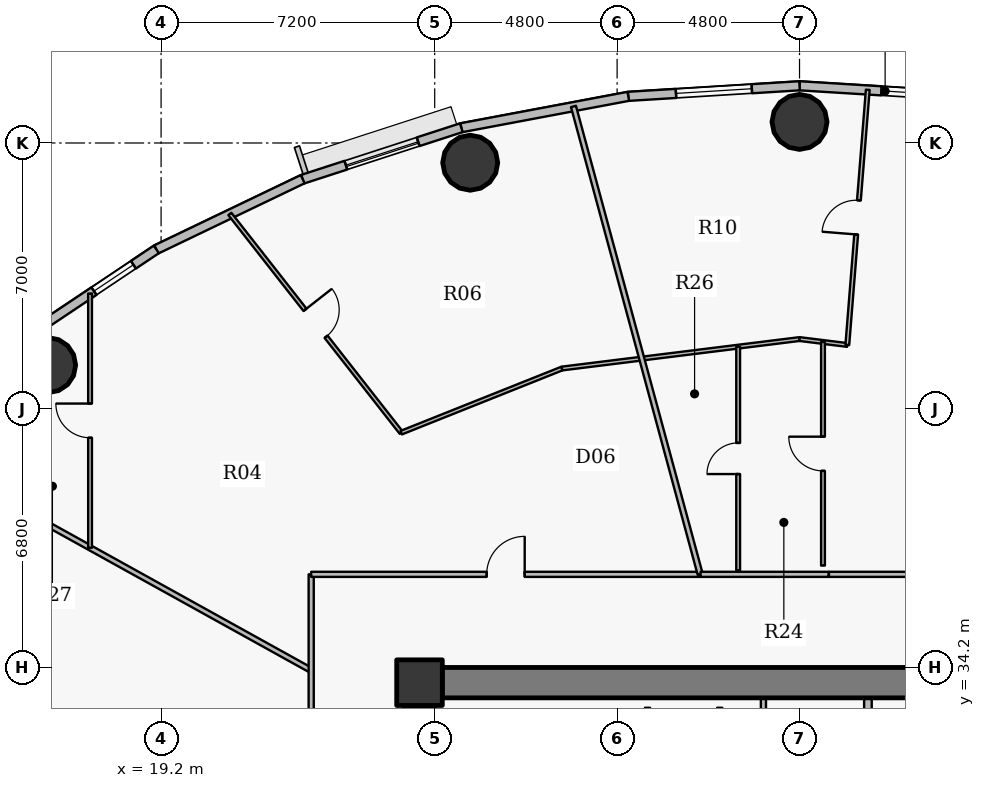
"""IFC4 building model, lengths in metres.
Left out: names, types, materials, properties, quantities, classifications, styles, units other than length and angle.
Written with IfcOpenShell. Run it as: python <this file> out.ifc"""

import sys

from ifc_helpers import new_model, si_unit, direction, frame, frame_2d, origin, origin_2d, place, context, subcontext, project, spatial, rectangle, hollow_circle, extrude, source, transform, mapped, element, fill, save


model = new_model("IFC4")
c1 = context("Model", 3, precision=1e-05, world=origin(), true_north=direction((0.0, 1.0)))
c2 = subcontext(c1, "Body", "Model", "MODEL_VIEW")
j1 = project(units=[si_unit("LENGTHUNIT", "METRE"), si_unit("PLANEANGLEUNIT", "RADIAN")], contexts=[c1])
p1 = place(None, origin())
s1 = spatial("IfcSite", under=j1, at=p1, CompositionType="ELEMENT")
p2 = place(p1, origin())
s2 = spatial("IfcBuilding", under=s1, at=p2, CompositionType="ELEMENT")
p3 = place(p2, frame((0.0, 0.0, 142.2)))
s3 = spatial("IfcBuildingStorey", under=s2, at=p3, CompositionType="ELEMENT", Elevation=142.2)
p4 = place(p3, frame((26.0, 33.8, 0.0), z_axis=(0.0, 0.0, 1.0), x_axis=(1.0, 0.0, 0.0)))
e1 = element("IfcColumn", 1, at=p4, inside=s3, PredefinedType="COLUMN", context=c2, shape_type="SweptSolid", body=[
    extrude(rectangle(XDim=1.2, YDim=1.2, at=origin_2d()), origin(), (0.0, 0.0, 1.0), 3.75),
])
p5 = place(p3, frame((26.6, 33.8, 0.0), z_axis=(0.0, 0.0, 1.0), x_axis=(1.0, 0.0, 0.0)))
e2 = element("IfcWall", 2, at=p5, inside=s3, PredefinedType="SHEAR", context=c2, shape_type="SweptSolid", body=[
    extrude(rectangle(XDim=18.8, YDim=0.8, at=frame_2d((9.4, 0.0))), origin(), (0.0, 0.0, 1.0), 2.9),
])
p6 = place(p3, frame((26.0, 20.8, 0.0), z_axis=(0.0, 0.0, 1.0), x_axis=(0.0, 1.0, 0.0)))
e3 = element("IfcWall", 3, at=p6, inside=s3, PredefinedType="SHEAR", context=c2, shape_type="SweptSolid", body=[
    extrude(rectangle(XDim=12.4, YDim=0.8, at=frame_2d((6.2, 0.0))), origin(), (0.0, 0.0, 1.0), 2.9),
])
p7 = place(p6, frame((5.79, 0.0, 0.0)))
e4 = element("IfcOpeningElement", 4, at=p7, cuts=e3, PredefinedType="OPENING", context=c2, shape_type="SweptSolid", body=[
    extrude(rectangle(XDim=0.82, YDim=2.1, at=origin_2d()), frame((0.41, 0.41, 1.05), z_axis=(0.0, -1.0, 0.0), x_axis=(1.0, 0.0, 0.0)), (0.0, 0.0, 1.0), 0.82),
])
for number, where, z_axis, x_axis in (
    (5, (36.0, 48.555, 0.0), (0.0, 0.0, 1.0), (1.0, 0.0, 0.0)),
    (6, (27.334, 47.481, 0.0), (0.0, 0.0, 1.0), (1.0, 0.0, 0.0)),
    (7, (16.227, 42.156, 0.0), (0.0, 0.0, 1.0), (1.0, 0.0, 0.0)),
):
    element("IfcColumn", number, at=place(p3, frame(where, z_axis=z_axis, x_axis=x_axis)), inside=s3, PredefinedType="COLUMN", context=c2, shape_type="SweptSolid", body=[
        extrude(hollow_circle(Radius=0.725, WallThickness=0.042, at=origin_2d()), origin(), (0.0, 0.0, 1.0), 3.75),
    ])
p8 = place(p3, frame((36.0, 49.505, 0.0), z_axis=(0.0, 0.0, 1.0), x_axis=(0.998107531589, -0.061492726276, 0.0)))
e8 = element("IfcWall", 8, at=p8, inside=s3, PredefinedType="SOLIDWALL", context=c2, shape_type="SweptSolid", body=[
    extrude(rectangle(XDim=4.514, YDim=0.24, at=frame_2d((2.257, 0.0))), origin(), (0.0, 0.0, 1.0), 3.45),
])
p9 = place(p8, frame((2.161, 0.0, 0.9)))
e9 = element("IfcOpeningElement", 9, at=p9, cuts=e8, PredefinedType="OPENING", context=c2, shape_type="SweptSolid", body=[
    extrude(rectangle(XDim=1.6, YDim=1.75, at=origin_2d()), frame((0.8, 0.13, 0.875), z_axis=(0.0, -1.0, 0.0), x_axis=(1.0, 0.0, 0.0)), (0.0, 0.0, 1.0), 0.26),
])
p10 = place(p3, frame((31.494, 49.227, 0.0), z_axis=(0.0, 0.0, 1.0), x_axis=(0.998107531589, 0.061492726276, 0.0)))
e10 = element("IfcWall", 10, at=p10, inside=s3, PredefinedType="SOLIDWALL", context=c2, shape_type="SweptSolid", body=[
    extrude(rectangle(XDim=4.514, YDim=0.24, at=frame_2d((2.257, 0.0))), origin(), (0.0, 0.0, 1.0), 3.45),
])
p11 = place(p10, frame((1.257, 0.0, 0.9)))
e11 = element("IfcOpeningElement", 11, at=p11, cuts=e10, PredefinedType="OPENING", context=c2, shape_type="SweptSolid", body=[
    extrude(rectangle(XDim=2.0, YDim=1.75, at=origin_2d()), frame((1.0, 0.13, 0.875), z_axis=(0.0, -1.0, 0.0), x_axis=(1.0, 0.0, 0.0)), (0.0, 0.0, 1.0), 0.26),
])
p12 = place(p3, frame((27.1, 48.401, 0.0), z_axis=(0.0, 0.0, 1.0), x_axis=(0.982789252177, 0.184730305596, 0.0)))
e12 = element("IfcWall", 12, at=p12, inside=s3, PredefinedType="SOLIDWALL", context=c2, shape_type="SweptSolid", body=[
    extrude(rectangle(XDim=4.471, YDim=0.24, at=frame_2d((2.235, 0.0))), origin(), (0.0, 0.0, 1.0), 3.45),
])
p13 = place(p3, frame((22.926, 47.047, 0.0), z_axis=(0.0, 0.0, 1.0), x_axis=(0.951211346073, 0.308540070495, 0.0)))
e13 = element("IfcWall", 13, at=p13, inside=s3, PredefinedType="SOLIDWALL", context=c2, shape_type="SweptSolid", body=[
    extrude(rectangle(XDim=4.388, YDim=0.24, at=frame_2d((2.194, 0.0))), origin(), (0.0, 0.0, 1.0), 3.45),
])
p14 = place(p13, frame((1.194, 0.0, 0.9)))
e14 = element("IfcOpeningElement", 14, at=p14, cuts=e13, PredefinedType="OPENING", context=c2, shape_type="SweptSolid", body=[
    extrude(rectangle(XDim=2.0, YDim=1.75, at=origin_2d()), frame((1.0, 0.13, 0.875), z_axis=(0.0, -1.0, 0.0), x_axis=(1.0, 0.0, 0.0)), (0.0, 0.0, 1.0), 0.26),
])
p15 = place(p3, frame((19.075, 45.199, 0.0), z_axis=(0.0, 0.0, 1.0), x_axis=(0.901589935876, 0.432591709962, 0.0)))
e15 = element("IfcWall", 15, at=p15, inside=s3, PredefinedType="SOLIDWALL", context=c2, shape_type="SweptSolid", body=[
    extrude(rectangle(XDim=4.272, YDim=0.24, at=frame_2d((2.136, 0.0))), origin(), (0.0, 0.0, 1.0), 3.45),
])
p16 = place(p3, frame((15.642, 42.903, 0.0), z_axis=(0.0, 0.0, 1.0), x_axis=(0.831221811447, 0.555940914284, 0.0)))
e16 = element("IfcWall", 16, at=p16, inside=s3, PredefinedType="SOLIDWALL", context=c2, shape_type="SweptSolid", body=[
    extrude(rectangle(XDim=4.13, YDim=0.24, at=frame_2d((2.065, 0.0))), origin(), (0.0, 0.0, 1.0), 3.45),
])
p17 = place(p16, frame((2.156, 0.0, 0.9)))
e17 = element("IfcOpeningElement", 17, at=p17, cuts=e16, PredefinedType="OPENING", context=c2, shape_type="SweptSolid", body=[
    extrude(rectangle(XDim=1.25, YDim=1.65, at=origin_2d()), frame((0.625, 0.13, 0.825), z_axis=(0.0, -1.0, 0.0), x_axis=(1.0, 0.0, 0.0)), (0.0, 0.0, 1.0), 0.26),
])
p18 = place(p3, frame((12.539, 40.005, 0.0), z_axis=(0.0, 0.0, 1.0), x_axis=(0.874619146564, -0.484810631549, 0.0)))
e18 = element("IfcWall", 18, at=p18, inside=s3, PredefinedType="PARTITIONING", context=c2, shape_type="SweptSolid", body=[
    extrude(rectangle(XDim=12.132, YDim=0.135, at=frame_2d((6.066, 0.0))), origin(), (0.0, 0.0, 1.0), 2.885),
])
p19 = place(p3, frame((17.331, 37.348, 0.0), z_axis=(0.0, 0.0, 1.0), x_axis=(0.0, 1.0, 0.0)))
e19 = element("IfcWall", 19, at=p19, inside=s3, PredefinedType="PARTITIONING", context=c2, shape_type="SweptSolid", body=[
    extrude(rectangle(XDim=6.691, YDim=0.1, at=frame_2d((3.345, 0.0))), origin(), (0.0, 0.0, 1.0), 2.885),
])
p20 = place(p19, frame((2.895, 0.0, 0.0)))
e20 = element("IfcOpeningElement", 20, at=p20, cuts=e19, PredefinedType="OPENING", context=c2, shape_type="SweptSolid", body=[
    extrude(rectangle(XDim=0.9, YDim=2.1, at=origin_2d()), frame((0.45, 0.06, 1.05), z_axis=(0.0, -1.0, 0.0), x_axis=(1.0, 0.0, 0.0)), (0.0, 0.0, 1.0), 0.12),
])
p21 = place(p3, frame((21.01, 46.133, 0.0), z_axis=(0.0, 0.0, 1.0), x_axis=(0.616738538538, -0.787168072956, 0.0)))
e21 = element("IfcWall", 21, at=p21, inside=s3, PredefinedType="PARTITIONING", context=c2, shape_type="SweptSolid", body=[
    extrude(rectangle(XDim=7.312, YDim=0.1, at=frame_2d((3.656, 0.0))), origin(), (0.0, 0.0, 1.0), 2.885),
])
p22 = place(p21, frame((3.206, 0.0, 0.0)))
e22 = element("IfcOpeningElement", 22, at=p22, cuts=e21, PredefinedType="OPENING", context=c2, shape_type="SweptSolid", body=[
    extrude(rectangle(XDim=0.9, YDim=2.1, at=origin_2d()), frame((0.45, 0.06, 1.05), z_axis=(0.0, -1.0, 0.0), x_axis=(1.0, 0.0, 0.0)), (0.0, 0.0, 1.0), 0.12),
])
p23 = place(p3, frame((23.15, 17.35, 0.0), z_axis=(0.0, 0.0, 1.0), x_axis=(0.0, 1.0, 0.0)))
e23 = element("IfcWall", 23, at=p23, inside=s3, PredefinedType="PARTITIONING", context=c2, shape_type="SweptSolid", body=[
    extrude(rectangle(XDim=19.3, YDim=0.135, at=frame_2d((9.65, 0.0))), origin(), (0.0, 0.0, 1.0), 2.885),
])
p24 = place(p23, frame((11.733, 0.0, 0.0)))
e24 = element("IfcOpeningElement", 24, at=p24, cuts=e23, PredefinedType="OPENING", context=c2, shape_type="SweptSolid", body=[
    extrude(rectangle(XDim=1.05, YDim=2.15, at=origin_2d()), frame((0.525, 0.078, 1.075), z_axis=(0.0, -1.0, 0.0), x_axis=(1.0, 0.0, 0.0)), (0.0, 0.0, 1.0), 0.155),
])
p25 = place(p23, frame((6.074, 0.0, 0.0)))
e25 = element("IfcOpeningElement", 25, at=p25, cuts=e23, PredefinedType="OPENING", context=c2, shape_type="SweptSolid", body=[
    extrude(rectangle(XDim=0.82, YDim=2.1, at=origin_2d()), frame((0.41, 0.078, 1.05), z_axis=(0.0, -1.0, 0.0), x_axis=(1.0, 0.0, 0.0)), (0.0, 0.0, 1.0), 0.155),
])
p26 = place(p3, frame((23.15, 36.65, 0.0), z_axis=(0.0, 0.0, 1.0), x_axis=(1.0, 0.0, 0.0)))
e26 = element("IfcWall", 26, at=p26, inside=s3, PredefinedType="PARTITIONING", context=c2, shape_type="SweptSolid", body=[
    extrude(rectangle(XDim=10.236, YDim=0.135, at=frame_2d((5.118, 0.0))), origin(), (0.0, 0.0, 1.0), 2.885),
])
p27 = place(p26, frame((4.618, 0.0, 0.0)))
e27 = element("IfcOpeningElement", 27, at=p27, cuts=e26, PredefinedType="OPENING", context=c2, shape_type="SweptSolid", body=[
    extrude(rectangle(XDim=1.0, YDim=2.15, at=origin_2d()), frame((0.5, 0.078, 1.075), z_axis=(0.0, -1.0, 0.0), x_axis=(1.0, 0.0, 0.0)), (0.0, 0.0, 1.0), 0.155),
])
p28 = place(p3, frame((25.519, 40.378, 0.0), z_axis=(0.0, 0.0, 1.0), x_axis=(0.928790623107, 0.37060488182, 0.0)))
e28 = element("IfcWall", 28, at=p28, inside=s3, PredefinedType="PARTITIONING", context=c2, shape_type="SweptSolid", body=[
    extrude(rectangle(XDim=4.554, YDim=0.1, at=frame_2d((2.277, 0.0))), origin(), (0.0, 0.0, 1.0), 2.885),
])
p29 = place(p3, frame((29.749, 42.066, 0.0), z_axis=(0.0, 0.0, 1.0), x_axis=(0.992395485088, 0.123090215599, 0.0)))
e29 = element("IfcWall", 29, at=p29, inside=s3, PredefinedType="PARTITIONING", context=c2, shape_type="SweptSolid", body=[
    extrude(rectangle(XDim=6.299, YDim=0.1, at=frame_2d((3.15, 0.0))), origin(), (0.0, 0.0, 1.0), 2.885),
])
p30 = place(p3, frame((30.052, 48.961, 0.0), z_axis=(0.0, 0.0, 1.0), x_axis=(0.261432565902, -0.965221743169, 0.0)))
e30 = element("IfcWall", 30, at=p30, inside=s3, PredefinedType="PARTITIONING", context=c2, shape_type="SweptSolid", body=[
    extrude(rectangle(XDim=12.755, YDim=0.135, at=frame_2d((6.377, 0.0))), origin(), (0.0, 0.0, 1.0), 2.885),
])
p31 = place(p3, frame((34.385, 36.757, 0.0), z_axis=(0.0, 0.0, 1.0), x_axis=(0.0, 1.0, 0.0)))
e31 = element("IfcWall", 31, at=p31, inside=s3, PredefinedType="PARTITIONING", context=c2, shape_type="SweptSolid", body=[
    extrude(rectangle(XDim=5.884, YDim=0.1, at=frame_2d((2.942, 0.0))), origin(), (0.0, 0.0, 1.0), 3.035),
])
p32 = place(p31, frame((2.532, 0.0, 0.0)))
e32 = element("IfcOpeningElement", 32, at=p32, cuts=e31, PredefinedType="OPENING", context=c2, shape_type="SweptSolid", body=[
    extrude(rectangle(XDim=0.82, YDim=2.1, at=origin_2d()), frame((0.41, 0.06, 1.05), z_axis=(0.0, -1.0, 0.0), x_axis=(1.0, 0.0, 0.0)), (0.0, 0.0, 1.0), 0.12),
])
p33 = place(p3, frame((35.05, 31.05, 0.0), z_axis=(0.0, 0.0, 1.0), x_axis=(0.0, 1.0, 0.0)))
e33 = element("IfcWall", 33, at=p33, inside=s3, PredefinedType="PARTITIONING", context=c2, shape_type="SweptSolid", body=[
    extrude(rectangle(XDim=2.35, YDim=0.135, at=frame_2d((1.175, 0.0))), origin(), (0.0, 0.0, 1.0), 3.035),
])
p34 = place(p33, frame((0.625, 0.0, 0.0)))
e34 = element("IfcOpeningElement", 34, at=p34, cuts=e33, PredefinedType="OPENING", context=c2, shape_type="SweptSolid", body=[
    extrude(rectangle(XDim=1.1, YDim=2.15, at=origin_2d()), frame((0.55, 0.078, 1.075), z_axis=(0.0, -1.0, 0.0), x_axis=(1.0, 0.0, 0.0)), (0.0, 0.0, 1.0), 0.155),
])
p35 = place(p3, frame((36.0, 42.841, 0.0), z_axis=(0.0, 0.0, 1.0), x_axis=(0.992384274499, -0.123180565541, 0.0)))
e35 = element("IfcWall", 35, at=p35, inside=s3, PredefinedType="PARTITIONING", context=c2, shape_type="SweptSolid", body=[
    extrude(rectangle(XDim=1.267, YDim=0.1, at=frame_2d((0.633, 0.0))), origin(), (0.0, 0.0, 1.0), 2.885),
])
p36 = place(p3, frame((36.617, 36.881, 0.0), z_axis=(0.0, 0.0, 1.0), x_axis=(0.0, 1.0, 0.0)))
e36 = element("IfcWall", 36, at=p36, inside=s3, PredefinedType="PARTITIONING", context=c2, shape_type="SweptSolid", body=[
    extrude(rectangle(XDim=5.884, YDim=0.1, at=frame_2d((2.942, 0.0))), origin(), (0.0, 0.0, 1.0), 3.45),
])
p37 = place(p36, frame((2.492, 0.0, 0.0)))
e37 = element("IfcOpeningElement", 37, at=p37, cuts=e36, PredefinedType="OPENING", context=c2, shape_type="SweptSolid", body=[
    extrude(rectangle(XDim=0.9, YDim=2.1, at=origin_2d()), frame((0.45, 0.06, 1.05), z_axis=(0.0, -1.0, 0.0), x_axis=(1.0, 0.0, 0.0)), (0.0, 0.0, 1.0), 0.12),
])
p38 = place(p3, frame((36.774, 36.65, 0.0), z_axis=(0.0, 0.0, 1.0), x_axis=(1.0, 0.0, 0.0)))
e38 = element("IfcWall", 38, at=p38, inside=s3, PredefinedType="PARTITIONING", context=c2, shape_type="SweptSolid", body=[
    extrude(rectangle(XDim=12.076, YDim=0.135, at=frame_2d((6.038, 0.0))), origin(), (0.0, 0.0, 1.0), 2.885),
])
p39 = place(p38, frame((5.538, 0.0, 0.0)))
e39 = element("IfcOpeningElement", 39, at=p39, cuts=e38, PredefinedType="OPENING", context=c2, shape_type="SweptSolid", body=[
    extrude(rectangle(XDim=1.0, YDim=2.15, at=origin_2d()), frame((0.5, 0.078, 1.075), z_axis=(0.0, -1.0, 0.0), x_axis=(1.0, 0.0, 0.0)), (0.0, 0.0, 1.0), 0.155),
])
p40 = place(p3, frame((37.258, 42.685, 0.0), z_axis=(0.0, 0.0, 1.0), x_axis=(0.079919529762, 0.9968013186, 0.0)))
e40 = element("IfcWall", 40, at=p40, inside=s3, PredefinedType="PARTITIONING", context=c2, shape_type="SweptSolid", body=[
    extrude(rectangle(XDim=6.736, YDim=0.1, at=frame_2d((3.368, 0.0))), origin(), (0.0, 0.0, 1.0), 2.885),
])
p41 = place(p40, frame((2.918, 0.0, 0.0)))
e41 = element("IfcOpeningElement", 41, at=p41, cuts=e40, PredefinedType="OPENING", context=c2, shape_type="SweptSolid", body=[
    extrude(rectangle(XDim=0.9, YDim=2.1, at=origin_2d()), frame((0.45, 0.06, 1.05), z_axis=(0.0, -1.0, 0.0), x_axis=(1.0, 0.0, 0.0)), (0.0, 0.0, 1.0), 0.12),
])
p42 = place(p3, frame((37.8, 31.05, 0.0), z_axis=(0.0, 0.0, 1.0), x_axis=(0.0, 1.0, 0.0)))
e42 = element("IfcWall", 42, at=p42, inside=s3, PredefinedType="PARTITIONING", context=c2, shape_type="SweptSolid", body=[
    extrude(rectangle(XDim=2.35, YDim=0.2, at=frame_2d((1.175, 0.0))), origin(), (0.0, 0.0, 1.0), 3.035),
])
p43 = place(p3, frame((32.0, 33.14, 0.0), z_axis=(0.0, 0.0, 1.0), x_axis=(0.0, -1.0, 0.0)))
e43 = element("IfcWall", 43, at=p43, inside=s3, PredefinedType="PARTITIONING", context=c2, shape_type="SweptSolid", body=[
    extrude(rectangle(XDim=1.03, YDim=0.135, at=frame_2d((0.515, 0.0))), origin(), (0.0, 0.0, 1.0), 2.985),
])
p44 = place(p3, frame((33.9, 32.11, 0.0), z_axis=(0.0, 0.0, 1.0), x_axis=(0.0, 1.0, 0.0)))
e44 = element("IfcWall", 44, at=p44, inside=s3, PredefinedType="PARTITIONING", context=c2, shape_type="SweptSolid", body=[
    extrude(rectangle(XDim=1.03, YDim=0.135, at=frame_2d((0.515, 0.0))), origin(), (0.0, 0.0, 1.0), 3.035),
])
p45 = place(p3, frame((33.396, 36.65, 0.0), z_axis=(0.0, 0.0, 1.0), x_axis=(1.0, 0.0, 0.0)))
e45 = element("IfcWall", 45, at=p45, inside=s3, PredefinedType="PARTITIONING", context=c2, shape_type="SweptSolid", body=[
    extrude(rectangle(XDim=3.367, YDim=0.135, at=frame_2d((1.684, 0.0))), origin(), (0.0, 0.0, 1.0), 2.885),
])
p46 = place(p3, frame((26.59, 34.2, 0.0), z_axis=(0.0, 0.0, 1.0), x_axis=(-1.0, 0.0, 0.0)))
e46 = element("IfcWall", 46, at=p46, inside=s3, PredefinedType="PARTITIONING", context=c2, shape_type="SweptSolid", body=[
    extrude(rectangle(XDim=0.99, YDim=0.135, at=frame_2d((0.495, 0.0))), origin(), (0.0, 0.0, 1.0), 2.885),
])
p47 = place(p3, frame((25.6, 33.893, 0.0), z_axis=(0.0, 0.0, 1.0), x_axis=(0.0, -1.0, 0.0)))
e47 = element("IfcWall", 47, at=p47, inside=s3, PredefinedType="PARTITIONING", context=c2, shape_type="SweptSolid", body=[
    extrude(rectangle(XDim=0.683, YDim=0.135, at=frame_2d((0.341, 0.0))), origin(), (0.0, 0.0, 1.0), 3.45),
])
m1 = source(origin(), c2, "Body", "SweptSolid", [
    extrude(rectangle(XDim=1.6, YDim=1.75, at=origin_2d()), frame((0.8, 0.03, 0.875), z_axis=(0.0, -1.0, 0.0), x_axis=(1.0, 0.0, 0.0)), (0.0, 0.0, 1.0), 0.06),
])
p48 = place(p9, origin())
e48 = element("IfcWindow", 48, at=p48, inside=s3, PartitioningType="DOUBLE_PANEL_VERTICAL", PredefinedType="WINDOW", context=c2, shape_type="MappedRepresentation", body=[
    mapped(m1, transform((0.0, 0.0, 0.0), x_axis=(1.0, 0.0, 0.0), y_axis=(0.0, 1.0, 0.0), z_axis=(0.0, 0.0, 1.0), scale=1.0)),
])
fill(e9, e48)
m2 = source(origin(), c2, "Body", "SweptSolid", [
    extrude(rectangle(XDim=2.0, YDim=1.75, at=origin_2d()), frame((1.0, 0.03, 0.875), z_axis=(0.0, -1.0, 0.0), x_axis=(1.0, 0.0, 0.0)), (0.0, 0.0, 1.0), 0.06),
])
p49 = place(p11, origin())
e49 = element("IfcWindow", 49, at=p49, inside=s3, PartitioningType="DOUBLE_PANEL_VERTICAL", PredefinedType="WINDOW", context=c2, shape_type="MappedRepresentation", body=[
    mapped(m2, transform((0.0, 0.0, 0.0), x_axis=(1.0, 0.0, 0.0), y_axis=(0.0, 1.0, 0.0), z_axis=(0.0, 0.0, 1.0), scale=1.0)),
])
fill(e11, e49)
p50 = place(p14, origin())
e50 = element("IfcWindow", 50, at=p50, inside=s3, PartitioningType="DOUBLE_PANEL_VERTICAL", PredefinedType="WINDOW", context=c2, shape_type="MappedRepresentation", body=[
    mapped(m2, transform((0.0, 0.0, 0.0), x_axis=(1.0, 0.0, 0.0), y_axis=(0.0, 1.0, 0.0), z_axis=(0.0, 0.0, 1.0), scale=1.0)),
])
fill(e14, e50)
m3 = source(origin(), c2, "Body", "SweptSolid", [
    extrude(rectangle(XDim=1.25, YDim=1.65, at=origin_2d()), frame((0.625, 0.03, 0.825), z_axis=(0.0, -1.0, 0.0), x_axis=(1.0, 0.0, 0.0)), (0.0, 0.0, 1.0), 0.06),
])
p51 = place(p17, origin())
e51 = element("IfcWindow", 51, at=p51, inside=s3, PartitioningType="SINGLE_PANEL", PredefinedType="WINDOW", context=c2, shape_type="MappedRepresentation", body=[
    mapped(m3, transform((0.0, 0.0, 0.0), x_axis=(1.0, 0.0, 0.0), y_axis=(0.0, 1.0, 0.0), z_axis=(0.0, 0.0, 1.0), scale=1.0)),
])
fill(e17, e51)
m4 = source(origin(), c2, "Body", "SweptSolid", [
    extrude(rectangle(XDim=0.9, YDim=2.1, at=origin_2d()), frame((0.45, 0.025, 1.05), z_axis=(0.0, -1.0, 0.0), x_axis=(1.0, 0.0, 0.0)), (0.0, 0.0, 1.0), 0.05),
])
p52 = place(p41, origin())
e52 = element("IfcDoor", 52, at=p52, inside=s3, OperationType="SINGLE_SWING_LEFT", PredefinedType="DOOR", context=c2, shape_type="MappedRepresentation", body=[
    mapped(m4, transform((0.0, 0.0, 0.0), x_axis=(1.0, 0.0, 0.0), y_axis=(0.0, 1.0, 0.0), z_axis=(0.0, 0.0, 1.0), scale=1.0)),
])
fill(e41, e52)
p53 = place(p37, origin())
e53 = element("IfcDoor", 53, at=p53, inside=s3, OperationType="SINGLE_SWING_RIGHT", PredefinedType="DOOR", context=c2, shape_type="MappedRepresentation", body=[
    mapped(m4, transform((0.0, 0.0, 0.0), x_axis=(1.0, 0.0, 0.0), y_axis=(0.0, 1.0, 0.0), z_axis=(0.0, 0.0, 1.0), scale=1.0)),
])
fill(e37, e53)
m5 = source(origin(), c2, "Body", "SweptSolid", [
    extrude(rectangle(XDim=0.82, YDim=2.1, at=origin_2d()), frame((0.41, 0.025, 1.05), z_axis=(0.0, -1.0, 0.0), x_axis=(1.0, 0.0, 0.0)), (0.0, 0.0, 1.0), 0.05),
])
p54 = place(p32, origin())
e54 = element("IfcDoor", 54, at=p54, inside=s3, OperationType="SINGLE_SWING_LEFT", PredefinedType="DOOR", context=c2, shape_type="MappedRepresentation", body=[
    mapped(m5, transform((0.0, 0.0, 0.0), x_axis=(1.0, 0.0, 0.0), y_axis=(0.0, 1.0, 0.0), z_axis=(0.0, 0.0, 1.0), scale=1.0)),
])
fill(e32, e54)
m6 = source(origin(), c2, "Body", "SweptSolid", [
    extrude(rectangle(XDim=1.0, YDim=2.15, at=origin_2d()), frame((0.5, 0.025, 1.075), z_axis=(0.0, -1.0, 0.0), x_axis=(1.0, 0.0, 0.0)), (0.0, 0.0, 1.0), 0.05),
])
p55 = place(p27, origin())
e55 = element("IfcDoor", 55, at=p55, inside=s3, OperationType="SINGLE_SWING_RIGHT", PredefinedType="DOOR", context=c2, shape_type="MappedRepresentation", body=[
    mapped(m6, transform((0.0, 0.0, 0.0), x_axis=(1.0, 0.0, 0.0), y_axis=(0.0, 1.0, 0.0), z_axis=(0.0, 0.0, 1.0), scale=1.0)),
])
fill(e27, e55)
p56 = place(p22, origin())
e56 = element("IfcDoor", 56, at=p56, inside=s3, OperationType="SINGLE_SWING_LEFT", PredefinedType="DOOR", context=c2, shape_type="MappedRepresentation", body=[
    mapped(m4, transform((0.0, 0.0, 0.0), x_axis=(1.0, 0.0, 0.0), y_axis=(0.0, 1.0, 0.0), z_axis=(0.0, 0.0, 1.0), scale=1.0)),
])
fill(e22, e56)
p57 = place(p20, origin())
e57 = element("IfcDoor", 57, at=p57, inside=s3, OperationType="SINGLE_SWING_RIGHT", PredefinedType="DOOR", context=c2, shape_type="MappedRepresentation", body=[
    mapped(m4, transform((0.0, 0.0, 0.0), x_axis=(1.0, 0.0, 0.0), y_axis=(0.0, 1.0, 0.0), z_axis=(0.0, 0.0, 1.0), scale=1.0)),
])
fill(e20, e57)
save(model, sys.argv[1])
